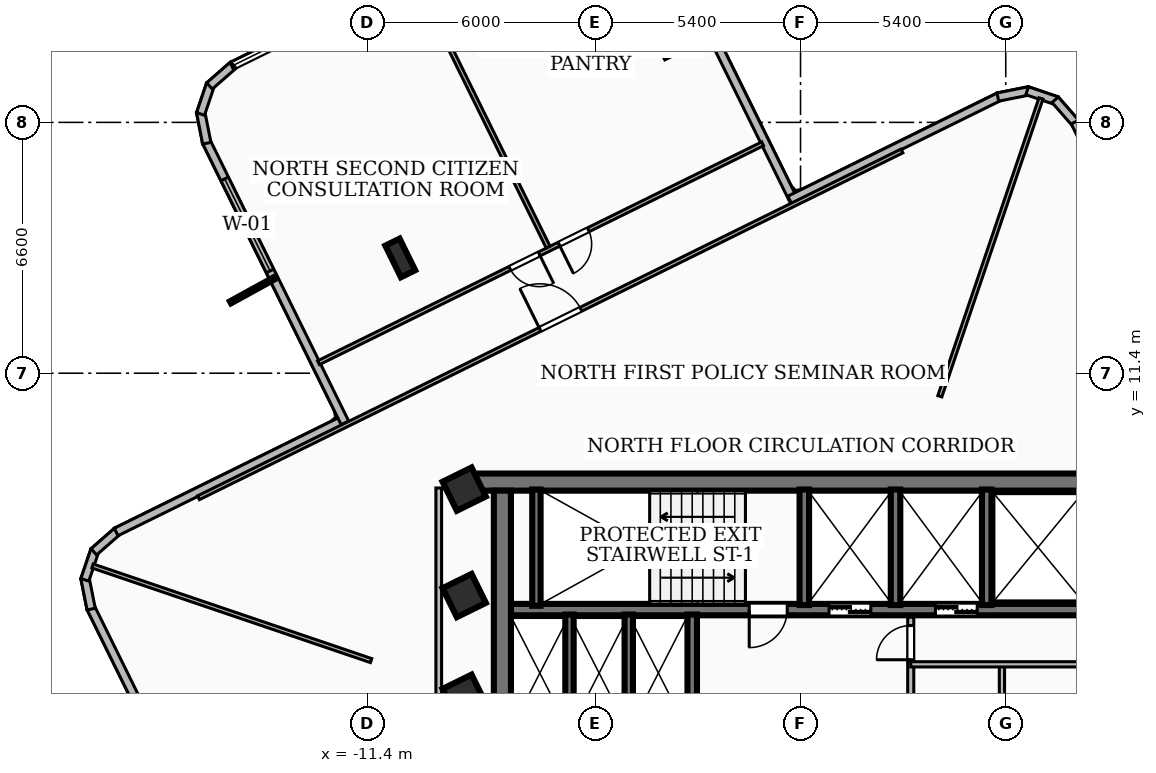
"""IFC4 building model, lengths in metres.
Left out: names, types, materials, properties, quantities, classifications, styles, units other than length and angle.
Written with IfcOpenShell. Run it as: python <this file> out.ifc"""

import sys

from ifc_helpers import new_model, si_unit, direction, frame, frame_2d, origin, origin_2d, place, context, subcontext, project, spatial, rectangle, i_section, extrude, element, fill, save


model = new_model("IFC4")
c1 = context("Model", 3, precision=1e-05, world=origin(), true_north=direction((0.0, 1.0)))
c2 = subcontext(c1, "Body", "Model", "MODEL_VIEW")
j1 = project(units=[si_unit("LENGTHUNIT", "METRE"), si_unit("PLANEANGLEUNIT", "RADIAN")], contexts=[c1])
p1 = place(None, origin())
s1 = spatial("IfcSite", under=j1, at=p1, CompositionType="ELEMENT")
p2 = place(p1, origin())
s2 = spatial("IfcBuilding", under=s1, at=p2, CompositionType="ELEMENT")
p3 = place(p2, frame((0.0, 0.0, 192.6)))
s3 = spatial("IfcBuildingStorey", under=s2, at=p3, CompositionType="ELEMENT", Elevation=192.6)
p4 = place(p3, frame((-8.78, 8.535, 0.0), z_axis=(0.0, 0.0, 1.0), x_axis=(1.0, 0.0, 0.0)))
e1 = element("IfcWall", 1, at=p4, inside=s3, PredefinedType="SHEAR", context=c2, shape_type="SweptSolid", body=[
    extrude(rectangle(XDim=17.56, YDim=0.45, at=frame_2d((8.78, 0.0))), origin(), (0.0, 0.0, 1.0), 3.2),
])
p5 = place(p3, frame((-7.845, 1.975, 0.0), z_axis=(0.0, 0.0, 1.0), x_axis=(0.0, 1.0, 0.0)))
e2 = element("IfcWall", 2, at=p5, inside=s3, PredefinedType="SHEAR", context=c2, shape_type="SweptSolid", body=[
    extrude(rectangle(XDim=6.335, YDim=0.45, at=frame_2d((3.167, 0.0))), origin(), (0.0, 0.0, 1.0), 3.2),
])
p6 = place(p3, frame((7.62, 5.18, 0.0), z_axis=(0.0, 0.0, 1.0), x_axis=(-1.0, 0.0, 0.0)))
e3 = element("IfcWall", 3, at=p6, inside=s3, PredefinedType="SOLIDWALL", context=c2, shape_type="SweptSolid", body=[
    extrude(rectangle(XDim=15.24, YDim=0.3, at=frame_2d((7.62, 0.0))), origin(), (0.0, 0.0, 1.0), 3.2),
])
p7 = place(p6, frame((5.77, 0.0, 0.0)))
e4 = element("IfcOpeningElement", 4, at=p7, cuts=e3, PredefinedType="OPENING", context=c2, shape_type="SweptSolid", body=[
    extrude(rectangle(XDim=1.1, YDim=2.15, at=frame_2d((0.55, 1.075))), frame((0.0, 0.16, 0.0), z_axis=(0.0, -1.0, 0.0), x_axis=(1.0, 0.0, 0.0)), (0.0, 0.0, 1.0), 0.32),
])
p8 = place(p6, frame((2.97, 0.0, 0.0)))
e5 = element("IfcOpeningElement", 5, at=p8, cuts=e3, PredefinedType="OPENING", context=c2, shape_type="SweptSolid", body=[
    extrude(rectangle(XDim=1.1, YDim=2.15, at=frame_2d((0.55, 1.075))), frame((0.0, 0.16, 0.0), z_axis=(0.0, -1.0, 0.0), x_axis=(1.0, 0.0, 0.0)), (0.0, 0.0, 1.0), 0.32),
])
p9 = place(p6, frame((7.97, 0.0, 0.0)))
e6 = element("IfcOpeningElement", 6, at=p9, cuts=e3, PredefinedType="OPENING", context=c2, shape_type="SweptSolid", body=[
    extrude(rectangle(XDim=1.0, YDim=2.1, at=frame_2d((0.5, 1.05))), frame((0.0, 0.16, 0.0), z_axis=(0.0, -1.0, 0.0), x_axis=(1.0, 0.0, 0.0)), (0.0, 0.0, 1.0), 0.32),
])
p10 = place(p3, frame((-6.95, 5.28, 0.0), z_axis=(0.0, 0.0, 1.0), x_axis=(0.0, 1.0, 0.0)))
e7 = element("IfcWall", 7, at=p10, inside=s3, PredefinedType="SOLIDWALL", context=c2, shape_type="SweptSolid", body=[
    extrude(rectangle(XDim=3.06, YDim=0.22, at=frame_2d((1.53, 0.0))), origin(), (0.0, 0.0, 1.0), 3.2),
])
for number, where, z_axis, x_axis in (
    (8, (0.1, 5.3, 0.0), (0.0, 0.0, 1.0), (0.0, 1.0, 0.0)),
    (9, (2.5, 5.3, 0.0), (0.0, 0.0, 1.0), (0.0, 1.0, 0.0)),
    (10, (4.9, 5.3, 0.0), (0.0, 0.0, 1.0), (0.0, 1.0, 0.0)),
):
    element("IfcWall", number, at=place(p3, frame(where, z_axis=z_axis, x_axis=x_axis)), inside=s3, PredefinedType="SOLIDWALL", context=c2, shape_type="SweptSolid", body=[
        extrude(rectangle(XDim=3.04, YDim=0.25, at=frame_2d((1.52, 0.0))), origin(), (0.0, 0.0, 1.0), 3.2),
    ])
p11 = place(p3, frame((-2.85, 1.98, 0.0), z_axis=(0.0, 0.0, 1.0), x_axis=(0.0, 1.0, 0.0)))
e11 = element("IfcWall", 11, at=p11, inside=s3, PredefinedType="SOLIDWALL", context=c2, shape_type="SweptSolid", body=[
    extrude(rectangle(XDim=3.07, YDim=0.25, at=frame_2d((1.535, 0.0))), origin(), (0.0, 0.0, 1.0), 3.2),
])
for number, where, z_axis, x_axis in (
    (12, (-6.08, 1.98, 0.0), (0.0, 0.0, 1.0), (0.0, 1.0, 0.0)),
    (13, (-4.52, 1.98, 0.0), (0.0, 0.0, 1.0), (0.0, 1.0, 0.0)),
):
    element("IfcWall", number, at=place(p3, frame(where, z_axis=z_axis, x_axis=x_axis)), inside=s3, PredefinedType="SOLIDWALL", context=c2, shape_type="SweptSolid", body=[
        extrude(rectangle(XDim=3.07, YDim=0.22, at=frame_2d((1.535, 0.0))), origin(), (0.0, 0.0, 1.0), 3.2),
    ])
for number, where, z_axis, x_axis in (
    (14, (-8.85, 2.9, 0.0), (0.0, 0.0, 1.0), (0.897, 0.442, 0.0)),
    (15, (-8.85, 5.55, 0.0), (0.0, 0.0, 1.0), (0.897, 0.442, 0.0)),
    (16, (-8.85, 8.35, 0.0), (0.0, 0.0, 1.0), (0.897, 0.442, 0.0)),
):
    element("IfcColumn", number, at=place(p3, frame(where, z_axis=z_axis, x_axis=x_axis)), inside=s3, PredefinedType="COLUMN", context=c2, shape_type="SweptSolid", body=[
        extrude(rectangle(XDim=0.85, YDim=0.85, at=origin_2d()), origin(), (0.0, 0.0, 1.0), 3.6),
    ])
for number, where, z_axis, x_axis in (
    (17, (-3.57, 20.207, 0.0), (0.0, 0.0, 1.0), (0.897, 0.442, 0.0)),
    (18, (-10.533, 14.433, 0.0), (0.0, 0.0, 1.0), (0.897, 0.442, 0.0)),
):
    element("IfcColumn", number, at=place(p3, frame(where, z_axis=z_axis, x_axis=x_axis)), inside=s3, PredefinedType="COLUMN", context=c2, shape_type="SweptSolid", body=[
        extrude(i_section(OverallWidth=0.418, OverallDepth=0.927, WebThickness=0.019, FlangeThickness=0.032, at=origin_2d()), origin(), (0.0, 0.0, 1.0), 3.6),
    ])
p12 = place(p3, frame((-15.96, -0.284, 0.0), z_axis=(0.0, 0.0, 1.0), x_axis=(-0.442004580174, 0.897012793167, 0.0)))
e19 = element("IfcWall", 19, at=p12, inside=s3, PredefinedType="SOLIDWALL", context=c2, shape_type="SweptSolid", body=[
    extrude(rectangle(XDim=6.158, YDim=0.22, at=frame_2d((3.079, 0.0))), origin(), (0.0, 0.0, 1.0), 3.2),
])
p13 = place(p3, frame((-18.666, 5.193, 0.0), z_axis=(0.0, 0.0, 1.0), x_axis=(-0.19532881852, 0.980737810353, 0.0)))
e20 = element("IfcWall", 20, at=p13, inside=s3, PredefinedType="SOLIDWALL", context=c2, shape_type="SweptSolid", body=[
    extrude(rectangle(XDim=0.835, YDim=0.22, at=frame_2d((0.417, 0.0))), origin(), (0.0, 0.0, 1.0), 3.2),
])
p14 = place(p3, frame((-18.832, 5.963, 0.0), z_axis=(0.0, 0.0, 1.0), x_axis=(0.320509908962, 0.947245162699, 0.0)))
e21 = element("IfcWall", 21, at=p14, inside=s3, PredefinedType="SOLIDWALL", context=c2, shape_type="SweptSolid", body=[
    extrude(rectangle(XDim=0.82, YDim=0.22, at=frame_2d((0.41, 0.0))), origin(), (0.0, 0.0, 1.0), 3.2),
])
p15 = place(p3, frame((-18.596, 6.7, 0.0), z_axis=(0.0, 0.0, 1.0), x_axis=(0.752794227209, 0.658255916404, 0.0)))
e22 = element("IfcWall", 22, at=p15, inside=s3, PredefinedType="SOLIDWALL", context=c2, shape_type="SweptSolid", body=[
    extrude(rectangle(XDim=0.834, YDim=0.22, at=frame_2d((0.417, 0.0))), origin(), (0.0, 0.0, 1.0), 3.2),
])
p16 = place(p3, frame((-18.009, 7.222, 0.0), z_axis=(0.0, 0.0, 1.0), x_axis=(0.896927600032, 0.44217743079, 0.0)))
e23 = element("IfcWall", 23, at=p16, inside=s3, PredefinedType="SOLIDWALL", context=c2, shape_type="SweptSolid", body=[
    extrude(rectangle(XDim=6.758, YDim=0.22, at=frame_2d((3.379, 0.0))), origin(), (0.0, 0.0, 1.0), 3.2),
])
p17 = place(p3, frame((-11.988, 10.092, 0.0), z_axis=(0.0, 0.0, 1.0), x_axis=(-0.442109392901, 0.896961138907, 0.0)))
e24 = element("IfcWall", 24, at=p17, inside=s3, PredefinedType="SOLIDWALL", context=c2, shape_type="SweptSolid", body=[
    extrude(rectangle(XDim=8.258, YDim=0.22, at=frame_2d((4.129, 0.0))), origin(), (0.0, 0.0, 1.0), 3.2),
])
p18 = place(p17, frame((4.458, 0.0, 0.85)))
e25 = element("IfcOpeningElement", 25, at=p18, cuts=e24, PredefinedType="OPENING", context=c2, shape_type="SweptSolid", body=[
    extrude(rectangle(XDim=2.7, YDim=2.1, at=frame_2d((1.35, 1.05))), frame((0.0, 0.12, 0.0), z_axis=(0.0, -1.0, 0.0), x_axis=(1.0, 0.0, 0.0)), (0.0, 0.0, 1.0), 0.24),
])
p19 = place(p3, frame((-15.623, 17.452, 0.0), z_axis=(0.0, 0.0, 1.0), x_axis=(-0.193866328911, 0.981027953992, 0.0)))
e26 = element("IfcWall", 26, at=p19, inside=s3, PredefinedType="SOLIDWALL", context=c2, shape_type="SweptSolid", body=[
    extrude(rectangle(XDim=0.835, YDim=0.22, at=frame_2d((0.417, 0.0))), origin(), (0.0, 0.0, 1.0), 3.2),
])
p20 = place(p3, frame((-15.788, 18.222, 0.0), z_axis=(0.0, 0.0, 1.0), x_axis=(0.320776894908, 0.947154783387, 0.0)))
e27 = element("IfcWall", 27, at=p20, inside=s3, PredefinedType="SOLIDWALL", context=c2, shape_type="SweptSolid", body=[
    extrude(rectangle(XDim=0.821, YDim=0.22, at=frame_2d((0.41, 0.0))), origin(), (0.0, 0.0, 1.0), 3.2),
])
p21 = place(p3, frame((-15.552, 18.959, 0.0), z_axis=(0.0, 0.0, 1.0), x_axis=(0.752794227209, 0.658255916404, 0.0)))
e28 = element("IfcWall", 28, at=p21, inside=s3, PredefinedType="SOLIDWALL", context=c2, shape_type="SweptSolid", body=[
    extrude(rectangle(XDim=0.834, YDim=0.22, at=frame_2d((0.417, 0.0))), origin(), (0.0, 0.0, 1.0), 3.2),
])
p22 = place(p3, frame((-3.817, 23.326, 0.0), z_axis=(0.0, 0.0, 1.0), x_axis=(0.442156293263, -0.896938020338, 0.0)))
e29 = element("IfcWall", 29, at=p22, inside=s3, PredefinedType="SOLIDWALL", context=c2, shape_type="SweptSolid", body=[
    extrude(rectangle(XDim=8.257, YDim=0.22, at=frame_2d((4.128, 0.0))), origin(), (0.0, 0.0, 1.0), 3.2),
])
p23 = place(p22, frame((1.1, 0.0, 0.85)))
e30 = element("IfcOpeningElement", 30, at=p23, cuts=e29, PredefinedType="OPENING", context=c2, shape_type="SweptSolid", body=[
    extrude(rectangle(XDim=2.7, YDim=1.65, at=frame_2d((1.35, 0.825))), frame((0.0, 0.12, 0.0), z_axis=(0.0, -1.0, 0.0), x_axis=(1.0, 0.0, 0.0)), (0.0, 0.0, 1.0), 0.24),
])
p24 = place(p3, frame((-0.284, 15.96, 0.0), z_axis=(0.0, 0.0, 1.0), x_axis=(0.897012793167, 0.442004580174, 0.0)))
e31 = element("IfcWall", 31, at=p24, inside=s3, PredefinedType="SOLIDWALL", context=c2, shape_type="SweptSolid", body=[
    extrude(rectangle(XDim=6.158, YDim=0.22, at=frame_2d((3.079, 0.0))), origin(), (0.0, 0.0, 1.0), 3.2),
])
p25 = place(p3, frame((5.193, 18.666, 0.0), z_axis=(0.0, 0.0, 1.0), x_axis=(0.980737810353, 0.19532881852, 0.0)))
e32 = element("IfcWall", 32, at=p25, inside=s3, PredefinedType="SOLIDWALL", context=c2, shape_type="SweptSolid", body=[
    extrude(rectangle(XDim=0.835, YDim=0.22, at=frame_2d((0.417, 0.0))), origin(), (0.0, 0.0, 1.0), 3.2),
])
p26 = place(p3, frame((5.963, 18.832, 0.0), z_axis=(0.0, 0.0, 1.0), x_axis=(0.947245162699, -0.320509908962, 0.0)))
e33 = element("IfcWall", 33, at=p26, inside=s3, PredefinedType="SOLIDWALL", context=c2, shape_type="SweptSolid", body=[
    extrude(rectangle(XDim=0.82, YDim=0.22, at=frame_2d((0.41, 0.0))), origin(), (0.0, 0.0, 1.0), 3.2),
])
p27 = place(p3, frame((6.7, 18.596, 0.0), z_axis=(0.0, 0.0, 1.0), x_axis=(0.658255916404, -0.752794227209, 0.0)))
e34 = element("IfcWall", 34, at=p27, inside=s3, PredefinedType="SOLIDWALL", context=c2, shape_type="SweptSolid", body=[
    extrude(rectangle(XDim=0.834, YDim=0.22, at=frame_2d((0.417, 0.0))), origin(), (0.0, 0.0, 1.0), 3.2),
])
p28 = place(p3, frame((7.222, 18.009, 0.0), z_axis=(0.0, 0.0, 1.0), x_axis=(0.44217743079, -0.896927600032, 0.0)))
e35 = element("IfcWall", 35, at=p28, inside=s3, PredefinedType="SOLIDWALL", context=c2, shape_type="SweptSolid", body=[
    extrude(rectangle(XDim=6.758, YDim=0.22, at=frame_2d((3.379, 0.0))), origin(), (0.0, 0.0, 1.0), 3.2),
])
p29 = place(p3, frame((2.9, 2.04, 0.0), z_axis=(0.0, 0.0, 1.0), x_axis=(0.0, 1.0, 0.0)))
e36 = element("IfcWall", 36, at=p29, inside=s3, PredefinedType="PARTITIONING", context=c2, shape_type="SweptSolid", body=[
    extrude(rectangle(XDim=2.94, YDim=0.16, at=frame_2d((1.47, 0.0))), origin(), (0.0, 0.0, 1.0), 2.43),
])
p30 = place(p29, frame((1.82, 0.0, 0.0)))
e37 = element("IfcOpeningElement", 37, at=p30, cuts=e36, PredefinedType="OPENING", context=c2, shape_type="SweptSolid", body=[
    extrude(rectangle(XDim=0.9, YDim=2.06, at=frame_2d((0.45, 1.03))), frame((0.0, 0.09, 0.0), z_axis=(0.0, -1.0, 0.0), x_axis=(1.0, 0.0, 0.0)), (0.0, 0.0, 1.0), 0.18),
])
p31 = place(p3, frame((2.9, 3.74, 0.0), z_axis=(0.0, 0.0, 1.0), x_axis=(1.0, 0.0, 0.0)))
e38 = element("IfcWall", 38, at=p31, inside=s3, PredefinedType="PARTITIONING", context=c2, shape_type="SweptSolid", body=[
    extrude(rectangle(XDim=4.65, YDim=0.138, at=frame_2d((2.325, 0.0))), origin(), (0.0, 0.0, 1.0), 3.2),
])
p32 = place(p3, frame((5.3, 1.85, 0.0), z_axis=(0.0, 0.0, 1.0), x_axis=(0.0, 1.0, 0.0)))
e39 = element("IfcWall", 39, at=p32, inside=s3, PredefinedType="PARTITIONING", context=c2, shape_type="SweptSolid", body=[
    extrude(rectangle(XDim=1.89, YDim=0.138, at=frame_2d((0.945, 0.0))), origin(), (0.0, 0.0, 1.0), 2.43),
])
p33 = place(p3, frame((-9.52, 1.75, 0.0), z_axis=(0.0, 0.0, 1.0), x_axis=(0.0, 1.0, 0.0)))
e40 = element("IfcWall", 40, at=p33, inside=s3, PredefinedType="PARTITIONING", context=c2, shape_type="SweptSolid", body=[
    extrude(rectangle(XDim=6.63, YDim=0.15, at=frame_2d((3.315, 0.0))), origin(), (0.0, 0.0, 1.0), 3.2),
])
p34 = place(p3, frame((3.666, 10.794, 0.0), z_axis=(0.0, 0.0, 1.0), x_axis=(0.32157793417, 0.946883114357, 0.0)))
e41 = element("IfcWall", 41, at=p34, inside=s3, PredefinedType="PARTITIONING", context=c2, shape_type="SweptSolid", body=[
    extrude(rectangle(XDim=8.274, YDim=0.11, at=frame_2d((4.137, 0.0))), origin(), (0.0, 0.0, 1.0), 3.2),
])
p35 = place(p3, frame((-11.3, 3.838, 0.0), z_axis=(0.0, 0.0, 1.0), x_axis=(-0.946882857271, 0.321578691158, 0.0)))
e42 = element("IfcWall", 42, at=p35, inside=s3, PredefinedType="PARTITIONING", context=c2, shape_type="SweptSolid", body=[
    extrude(rectangle(XDim=7.74, YDim=0.11, at=frame_2d((3.87, 0.0))), origin(), (0.0, 0.0, 1.0), 3.2),
])
p36 = place(p3, frame((-15.843, 8.122, 0.0), z_axis=(0.0, 0.0, 1.0), x_axis=(0.896951333774, 0.442129285211, 0.0)))
e43 = element("IfcWall", 43, at=p36, inside=s3, PredefinedType="PARTITIONING", context=c2, shape_type="SweptSolid", body=[
    extrude(rectangle(XDim=20.639, YDim=0.11, at=frame_2d((10.319, 0.0))), origin(), (0.0, 0.0, 1.0), 2.504),
])
p37 = place(p36, frame((10.02, 0.0, 0.0)))
e44 = element("IfcOpeningElement", 44, at=p37, cuts=e43, PredefinedType="OPENING", context=c2, shape_type="SweptSolid", body=[
    extrude(rectangle(XDim=1.2, YDim=2.1, at=frame_2d((0.6, 1.05))), frame((0.0, 0.065, 0.0), z_axis=(0.0, -1.0, 0.0), x_axis=(1.0, 0.0, 0.0)), (0.0, 0.0, 1.0), 0.13),
])
p38 = place(p3, frame((-6.643, 14.72, 0.0), z_axis=(0.0, 0.0, 1.0), x_axis=(-0.442022597005, 0.897003915118, 0.0)))
e45 = element("IfcWall", 45, at=p38, inside=s3, PredefinedType="PARTITIONING", context=c2, shape_type="SweptSolid", body=[
    extrude(rectangle(XDim=7.875, YDim=0.11, at=frame_2d((3.938, 0.0))), origin(), (0.0, 0.0, 1.0), 3.2),
])
p39 = place(p3, frame((-0.997, 17.436, 0.0), z_axis=(0.0, 0.0, 1.0), x_axis=(-0.896946100231, -0.442139902385, 0.0)))
e46 = element("IfcWall", 46, at=p39, inside=s3, PredefinedType="PARTITIONING", context=c2, shape_type="SweptSolid", body=[
    extrude(rectangle(XDim=13.03, YDim=0.11, at=frame_2d((6.515, 0.0))), origin(), (0.0, 0.0, 1.0), 2.504),
])
p40 = place(p39, frame((5.115, 0.0, 0.0)))
e47 = element("IfcOpeningElement", 47, at=p40, cuts=e46, PredefinedType="OPENING", context=c2, shape_type="SweptSolid", body=[
    extrude(rectangle(XDim=0.86, YDim=2.04, at=frame_2d((0.43, 1.02))), frame((0.0, 0.065, 0.0), z_axis=(0.0, -1.0, 0.0), x_axis=(1.0, 0.0, 0.0)), (0.0, 0.0, 1.0), 0.13),
])
p41 = place(p39, frame((6.555, 0.0, 0.0)))
e48 = element("IfcOpeningElement", 48, at=p41, cuts=e46, PredefinedType="OPENING", context=c2, shape_type="SweptSolid", body=[
    extrude(rectangle(XDim=0.86, YDim=2.04, at=frame_2d((0.43, 1.02))), frame((0.0, 0.065, 0.0), z_axis=(0.0, -1.0, 0.0), x_axis=(1.0, 0.0, 0.0)), (0.0, 0.0, 1.0), 0.13),
])
p42 = place(p18, origin())
e49 = element("IfcWindow", 49, at=p42, inside=s3, PartitioningType="SINGLE_PANEL", PredefinedType="WINDOW", context=c2, shape_type="SweptSolid", body=[
    extrude(rectangle(XDim=2.7, YDim=2.1, at=frame_2d((1.35, 1.05))), frame((0.0, 0.03, 0.0), z_axis=(0.0, -1.0, 0.0), x_axis=(1.0, 0.0, 0.0)), (0.0, 0.0, 1.0), 0.06),
])
fill(e25, e49)
p43 = place(p7, origin())
e50 = element("IfcDoor", 50, at=p43, inside=s3, OperationType="DOUBLE_DOOR_SLIDING", PredefinedType="DOOR", context=c2, shape_type="SweptSolid", body=[
    extrude(rectangle(XDim=1.1, YDim=2.15, at=frame_2d((0.55, 1.075))), frame((0.0, 0.025, 0.0), z_axis=(0.0, -1.0, 0.0), x_axis=(1.0, 0.0, 0.0)), (0.0, 0.0, 1.0), 0.05),
])
fill(e4, e50)
p44 = place(p8, origin())
e51 = element("IfcDoor", 51, at=p44, inside=s3, OperationType="DOUBLE_DOOR_SLIDING", PredefinedType="DOOR", context=c2, shape_type="SweptSolid", body=[
    extrude(rectangle(XDim=1.1, YDim=2.15, at=frame_2d((0.55, 1.075))), frame((0.0, 0.025, 0.0), z_axis=(0.0, -1.0, 0.0), x_axis=(1.0, 0.0, 0.0)), (0.0, 0.0, 1.0), 0.05),
])
fill(e5, e51)
p45 = place(p9, origin())
e52 = element("IfcDoor", 52, at=p45, inside=s3, OperationType="SINGLE_SWING_RIGHT", PredefinedType="DOOR", context=c2, shape_type="SweptSolid", body=[
    extrude(rectangle(XDim=1.0, YDim=2.1, at=frame_2d((0.5, 1.05))), frame((0.0, 0.025, 0.0), z_axis=(0.0, -1.0, 0.0), x_axis=(1.0, 0.0, 0.0)), (0.0, 0.0, 1.0), 0.05),
])
fill(e6, e52)
p46 = place(p30, origin())
e53 = element("IfcDoor", 53, at=p46, inside=s3, OperationType="SINGLE_SWING_LEFT", PredefinedType="DOOR", context=c2, shape_type="SweptSolid", body=[
    extrude(rectangle(XDim=0.9, YDim=2.06, at=frame_2d((0.45, 1.03))), frame((0.0, 0.025, 0.0), z_axis=(0.0, -1.0, 0.0), x_axis=(1.0, 0.0, 0.0)), (0.0, 0.0, 1.0), 0.05),
])
fill(e37, e53)
p47 = place(p37, origin())
e54 = element("IfcDoor", 54, at=p47, inside=s3, OperationType="SINGLE_SWING_LEFT", PredefinedType="DOOR", context=c2, shape_type="SweptSolid", body=[
    extrude(rectangle(XDim=1.2, YDim=2.1, at=frame_2d((0.6, 1.05))), frame((0.0, 0.025, 0.0), z_axis=(0.0, -1.0, 0.0), x_axis=(1.0, 0.0, 0.0)), (0.0, 0.0, 1.0), 0.05),
])
fill(e44, e54)
p48 = place(p40, origin())
e55 = element("IfcDoor", 55, at=p48, inside=s3, OperationType="SINGLE_SWING_RIGHT", PredefinedType="DOOR", context=c2, shape_type="SweptSolid", body=[
    extrude(rectangle(XDim=0.86, YDim=2.04, at=frame_2d((0.43, 1.02))), frame((0.0, 0.025, 0.0), z_axis=(0.0, -1.0, 0.0), x_axis=(1.0, 0.0, 0.0)), (0.0, 0.0, 1.0), 0.05),
])
fill(e47, e55)
p49 = place(p41, origin())
e56 = element("IfcDoor", 56, at=p49, inside=s3, OperationType="SINGLE_SWING_LEFT", PredefinedType="DOOR", context=c2, shape_type="SweptSolid", body=[
    extrude(rectangle(XDim=0.86, YDim=2.04, at=frame_2d((0.43, 1.02))), frame((0.0, 0.025, 0.0), z_axis=(0.0, -1.0, 0.0), x_axis=(1.0, 0.0, 0.0)), (0.0, 0.0, 1.0), 0.05),
])
fill(e48, e56)
save(model, sys.argv[1])
